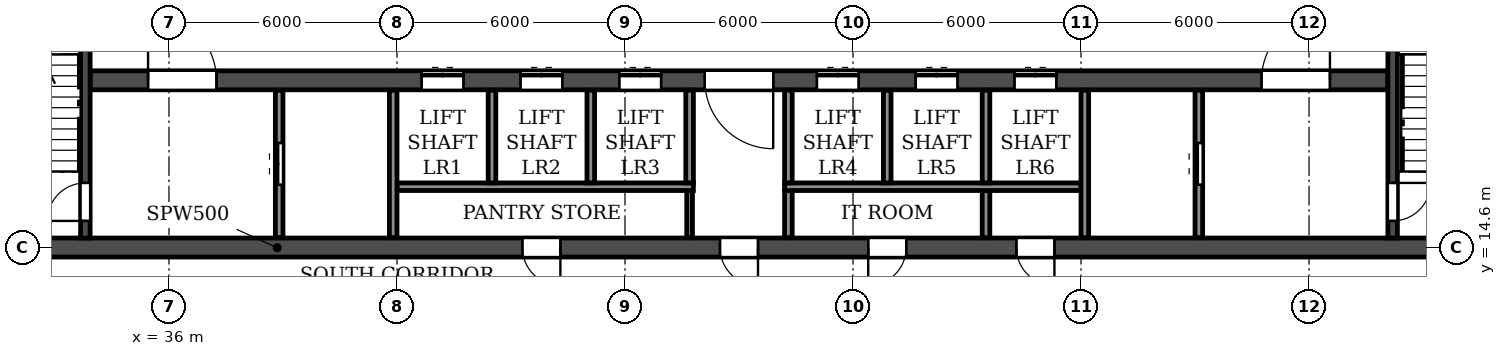
"""IFC4 building model, lengths in metres.
Left out: names, types, materials, properties, quantities, classifications, styles, units other than length and angle.
Written with IfcOpenShell. Run it as: python <this file> out.ifc"""

import sys

from ifc_helpers import new_model, si_unit, direction, frame, frame_2d, origin, place, context, subcontext, project, spatial, rectangle, extrude, element, fill, save


model = new_model("IFC4")
c1 = context("Model", 3, precision=1e-05, world=origin(), true_north=direction((0.0, 1.0)))
c2 = subcontext(c1, "Body", "Model", "MODEL_VIEW")
j1 = project(units=[si_unit("LENGTHUNIT", "METRE"), si_unit("PLANEANGLEUNIT", "RADIAN")], contexts=[c1])
p1 = place(None, origin())
s1 = spatial("IfcSite", under=j1, at=p1, CompositionType="ELEMENT")
p2 = place(p1, origin())
s2 = spatial("IfcBuilding", under=s1, at=p2, CompositionType="ELEMENT")
p3 = place(p2, frame((0.0, 0.0, 105.9)))
s3 = spatial("IfcBuildingStorey", under=s2, at=p3, CompositionType="ELEMENT", Elevation=105.9)
p4 = place(p3, frame((14.6, 14.6, 0.0), z_axis=(0.0, 0.0, 1.0), x_axis=(1.0, 0.0, 0.0)))
e1 = element("IfcWall", 1, at=p4, inside=s3, PredefinedType="SOLIDWALL", context=c2, shape_type="SweptSolid", body=[
    extrude(rectangle(XDim=72.8, YDim=0.5, at=frame_2d((36.4, 0.0))), origin(), (0.0, 0.0, 1.0), 3.06),
])
p5 = place(p4, frame((4.3, 0.0, 0.0)))
e2 = element("IfcOpeningElement", 2, at=p5, cuts=e1, PredefinedType="OPENING", context=c2, shape_type="SweptSolid", body=[
    extrude(rectangle(XDim=1.0, YDim=2.1, at=frame_2d((0.5, 1.05))), frame((0.0, 0.26, 0.0), z_axis=(0.0, -1.0, 0.0), x_axis=(1.0, 0.0, 0.0)), (0.0, 0.0, 1.0), 0.52),
])
p6 = place(p4, frame((12.25, 0.0, 0.0)))
e3 = element("IfcOpeningElement", 3, at=p6, cuts=e1, PredefinedType="OPENING", context=c2, shape_type="SweptSolid", body=[
    extrude(rectangle(XDim=0.9, YDim=2.1, at=frame_2d((0.45, 1.05))), frame((0.0, 0.26, 0.0), z_axis=(0.0, -1.0, 0.0), x_axis=(1.0, 0.0, 0.0)), (0.0, 0.0, 1.0), 0.52),
])
p7 = place(p4, frame((16.8, 0.0, 0.0)))
e4 = element("IfcOpeningElement", 4, at=p7, cuts=e1, PredefinedType="OPENING", context=c2, shape_type="SweptSolid", body=[
    extrude(rectangle(XDim=1.0, YDim=2.1, at=frame_2d((0.5, 1.05))), frame((0.0, 0.26, 0.0), z_axis=(0.0, -1.0, 0.0), x_axis=(1.0, 0.0, 0.0)), (0.0, 0.0, 1.0), 0.52),
])
p8 = place(p4, frame((30.7, 0.0, 0.0)))
e5 = element("IfcOpeningElement", 5, at=p8, cuts=e1, PredefinedType="OPENING", context=c2, shape_type="SweptSolid", body=[
    extrude(rectangle(XDim=1.0, YDim=2.1, at=frame_2d((0.5, 1.05))), frame((0.0, 0.26, 0.0), z_axis=(0.0, -1.0, 0.0), x_axis=(1.0, 0.0, 0.0)), (0.0, 0.0, 1.0), 0.52),
])
p9 = place(p4, frame((35.9, 0.0, 0.0)))
e6 = element("IfcOpeningElement", 6, at=p9, cuts=e1, PredefinedType="OPENING", context=c2, shape_type="SweptSolid", body=[
    extrude(rectangle(XDim=1.0, YDim=2.1, at=frame_2d((0.5, 1.05))), frame((0.0, 0.26, 0.0), z_axis=(0.0, -1.0, 0.0), x_axis=(1.0, 0.0, 0.0)), (0.0, 0.0, 1.0), 0.52),
])
p10 = place(p4, frame((39.8, 0.0, 0.0)))
e7 = element("IfcOpeningElement", 7, at=p10, cuts=e1, PredefinedType="OPENING", context=c2, shape_type="SweptSolid", body=[
    extrude(rectangle(XDim=1.0, YDim=2.1, at=frame_2d((0.5, 1.05))), frame((0.0, 0.26, 0.0), z_axis=(0.0, -1.0, 0.0), x_axis=(1.0, 0.0, 0.0)), (0.0, 0.0, 1.0), 0.52),
])
p11 = place(p4, frame((43.7, 0.0, 0.0)))
e8 = element("IfcOpeningElement", 8, at=p11, cuts=e1, PredefinedType="OPENING", context=c2, shape_type="SweptSolid", body=[
    extrude(rectangle(XDim=1.0, YDim=2.1, at=frame_2d((0.5, 1.05))), frame((0.0, 0.26, 0.0), z_axis=(0.0, -1.0, 0.0), x_axis=(1.0, 0.0, 0.0)), (0.0, 0.0, 1.0), 0.52),
])
p12 = place(p4, frame((55.0, 0.0, 0.0)))
e9 = element("IfcOpeningElement", 9, at=p12, cuts=e1, PredefinedType="OPENING", context=c2, shape_type="SweptSolid", body=[
    extrude(rectangle(XDim=1.0, YDim=2.1, at=frame_2d((0.5, 1.05))), frame((0.0, 0.26, 0.0), z_axis=(0.0, -1.0, 0.0), x_axis=(1.0, 0.0, 0.0)), (0.0, 0.0, 1.0), 0.52),
])
p13 = place(p4, frame((59.65, 0.0, 0.0)))
e10 = element("IfcOpeningElement", 10, at=p13, cuts=e1, PredefinedType="OPENING", context=c2, shape_type="SweptSolid", body=[
    extrude(rectangle(XDim=0.9, YDim=2.1, at=frame_2d((0.45, 1.05))), frame((0.0, 0.26, 0.0), z_axis=(0.0, -1.0, 0.0), x_axis=(1.0, 0.0, 0.0)), (0.0, 0.0, 1.0), 0.52),
])
p14 = place(p4, frame((67.5, 0.0, 0.0)))
e11 = element("IfcOpeningElement", 11, at=p14, cuts=e1, PredefinedType="OPENING", context=c2, shape_type="SweptSolid", body=[
    extrude(rectangle(XDim=1.0, YDim=2.1, at=frame_2d((0.5, 1.05))), frame((0.0, 0.26, 0.0), z_axis=(0.0, -1.0, 0.0), x_axis=(1.0, 0.0, 0.0)), (0.0, 0.0, 1.0), 0.52),
])
p15 = place(p3, frame((33.925, 19.0, 0.0), z_axis=(0.0, 0.0, 1.0), x_axis=(1.0, 0.0, 0.0)))
e12 = element("IfcWall", 12, at=p15, inside=s3, PredefinedType="SOLIDWALL", context=c2, shape_type="SweptSolid", body=[
    extrude(rectangle(XDim=34.15, YDim=0.5, at=frame_2d((17.075, 0.0))), origin(), (0.0, 0.0, 1.0), 3.06),
])
p16 = place(p15, frame((16.175, 0.0, 0.0)))
e13 = element("IfcOpeningElement", 13, at=p16, cuts=e12, PredefinedType="OPENING", context=c2, shape_type="SweptSolid", body=[
    extrude(rectangle(XDim=1.8, YDim=2.1, at=frame_2d((0.9, 1.05))), frame((0.0, 0.26, 0.0), z_axis=(0.0, -1.0, 0.0), x_axis=(1.0, 0.0, 0.0)), (0.0, 0.0, 1.0), 0.52),
])
p17 = place(p15, frame((1.525, 0.0, 0.0)))
e14 = element("IfcOpeningElement", 14, at=p17, cuts=e12, PredefinedType="OPENING", context=c2, shape_type="SweptSolid", body=[
    extrude(rectangle(XDim=1.8, YDim=2.1, at=frame_2d((0.9, 1.05))), frame((0.0, 0.26, 0.0), z_axis=(0.0, -1.0, 0.0), x_axis=(1.0, 0.0, 0.0)), (0.0, 0.0, 1.0), 0.52),
])
p18 = place(p15, frame((8.725, 0.0, 0.0)))
e15 = element("IfcOpeningElement", 15, at=p18, cuts=e12, PredefinedType="OPENING", context=c2, shape_type="SweptSolid", body=[
    extrude(rectangle(XDim=1.1, YDim=2.1, at=frame_2d((0.55, 1.05))), frame((0.0, 0.26, 0.0), z_axis=(0.0, -1.0, 0.0), x_axis=(1.0, 0.0, 0.0)), (0.0, 0.0, 1.0), 0.52),
])
p19 = place(p15, frame((11.325, 0.0, 0.0)))
e16 = element("IfcOpeningElement", 16, at=p19, cuts=e12, PredefinedType="OPENING", context=c2, shape_type="SweptSolid", body=[
    extrude(rectangle(XDim=1.1, YDim=2.1, at=frame_2d((0.55, 1.05))), frame((0.0, 0.26, 0.0), z_axis=(0.0, -1.0, 0.0), x_axis=(1.0, 0.0, 0.0)), (0.0, 0.0, 1.0), 0.52),
])
p20 = place(p15, frame((13.925, 0.0, 0.0)))
e17 = element("IfcOpeningElement", 17, at=p20, cuts=e12, PredefinedType="OPENING", context=c2, shape_type="SweptSolid", body=[
    extrude(rectangle(XDim=1.1, YDim=2.1, at=frame_2d((0.55, 1.05))), frame((0.0, 0.26, 0.0), z_axis=(0.0, -1.0, 0.0), x_axis=(1.0, 0.0, 0.0)), (0.0, 0.0, 1.0), 0.52),
])
p21 = place(p15, frame((19.125, 0.0, 0.0)))
e18 = element("IfcOpeningElement", 18, at=p21, cuts=e12, PredefinedType="OPENING", context=c2, shape_type="SweptSolid", body=[
    extrude(rectangle(XDim=1.1, YDim=2.1, at=frame_2d((0.55, 1.05))), frame((0.0, 0.26, 0.0), z_axis=(0.0, -1.0, 0.0), x_axis=(1.0, 0.0, 0.0)), (0.0, 0.0, 1.0), 0.52),
])
p22 = place(p15, frame((21.725, 0.0, 0.0)))
e19 = element("IfcOpeningElement", 19, at=p22, cuts=e12, PredefinedType="OPENING", context=c2, shape_type="SweptSolid", body=[
    extrude(rectangle(XDim=1.1, YDim=2.1, at=frame_2d((0.55, 1.05))), frame((0.0, 0.26, 0.0), z_axis=(0.0, -1.0, 0.0), x_axis=(1.0, 0.0, 0.0)), (0.0, 0.0, 1.0), 0.52),
])
p23 = place(p15, frame((24.325, 0.0, 0.0)))
e20 = element("IfcOpeningElement", 20, at=p23, cuts=e12, PredefinedType="OPENING", context=c2, shape_type="SweptSolid", body=[
    extrude(rectangle(XDim=1.1, YDim=2.1, at=frame_2d((0.55, 1.05))), frame((0.0, 0.26, 0.0), z_axis=(0.0, -1.0, 0.0), x_axis=(1.0, 0.0, 0.0)), (0.0, 0.0, 1.0), 0.52),
])
p24 = place(p15, frame((30.825, 0.0, 0.0)))
e21 = element("IfcOpeningElement", 21, at=p24, cuts=e12, PredefinedType="OPENING", context=c2, shape_type="SweptSolid", body=[
    extrude(rectangle(XDim=1.8, YDim=2.1, at=frame_2d((0.9, 1.05))), frame((0.0, 0.26, 0.0), z_axis=(0.0, -1.0, 0.0), x_axis=(1.0, 0.0, 0.0)), (0.0, 0.0, 1.0), 0.52),
])
p25 = place(p3, frame((33.8, 14.85, 0.0), z_axis=(0.0, 0.0, 1.0), x_axis=(0.0, 1.0, 0.0)))
e22 = element("IfcWall", 22, at=p25, inside=s3, PredefinedType="SOLIDWALL", context=c2, shape_type="SweptSolid", body=[
    extrude(rectangle(XDim=7.625, YDim=0.25, at=frame_2d((3.812, 0.0))), origin(), (0.0, 0.0, 1.0), 3.06),
])
p26 = place(p25, frame((0.45, 0.0, 0.0)))
e23 = element("IfcOpeningElement", 23, at=p26, cuts=e22, PredefinedType="OPENING", context=c2, shape_type="SweptSolid", body=[
    extrude(rectangle(XDim=1.0, YDim=2.1, at=frame_2d((0.5, 1.05))), frame((0.0, 0.135, 0.0), z_axis=(0.0, -1.0, 0.0), x_axis=(1.0, 0.0, 0.0)), (0.0, 0.0, 1.0), 0.27),
])
p27 = place(p3, frame((68.2, 14.85, 0.0), z_axis=(0.0, 0.0, 1.0), x_axis=(0.0, 1.0, 0.0)))
e24 = element("IfcWall", 24, at=p27, inside=s3, PredefinedType="SOLIDWALL", context=c2, shape_type="SweptSolid", body=[
    extrude(rectangle(XDim=7.625, YDim=0.25, at=frame_2d((3.812, 0.0))), origin(), (0.0, 0.0, 1.0), 3.06),
])
p28 = place(p27, frame((0.45, 0.0, 0.0)))
e25 = element("IfcOpeningElement", 25, at=p28, cuts=e24, PredefinedType="OPENING", context=c2, shape_type="SweptSolid", body=[
    extrude(rectangle(XDim=1.0, YDim=2.1, at=frame_2d((0.5, 1.05))), frame((0.0, 0.135, 0.0), z_axis=(0.0, -1.0, 0.0), x_axis=(1.0, 0.0, 0.0)), (0.0, 0.0, 1.0), 0.27),
])
p29 = place(p3, frame((49.7, 14.86, 0.0), z_axis=(0.0, 0.0, 1.0), x_axis=(0.0, 1.0, 0.0)))
e26 = element("IfcWall", 26, at=p29, inside=s3, PredefinedType="PARTITIONING", context=c2, shape_type="SweptSolid", body=[
    extrude(rectangle(XDim=1.24, YDim=0.15, at=frame_2d((0.62, 0.0))), origin(), (0.0, 0.0, 1.0), 3.06),
])
for number, where, z_axis, x_axis in (
    (27, (52.3, 14.86, 0.0), (0.0, 0.0, 1.0), (0.0, 1.0, 0.0)),
    (28, (57.5, 14.86, 0.0), (0.0, 0.0, 1.0), (0.0, 1.0, 0.0)),
):
    element("IfcWall", number, at=place(p3, frame(where, z_axis=z_axis, x_axis=x_axis)), inside=s3, PredefinedType="PARTITIONING", context=c2, shape_type="SweptSolid", body=[
        extrude(rectangle(XDim=1.24, YDim=0.2, at=frame_2d((0.62, 0.0))), origin(), (0.0, 0.0, 1.0), 3.06),
    ])
for number, where, z_axis, x_axis in (
    (29, (42.0, 16.2, 0.0), (0.0, 0.0, 1.0), (1.0, 0.0, 0.0)),
    (30, (52.2, 16.2, 0.0), (0.0, 0.0, 1.0), (1.0, 0.0, 0.0)),
):
    element("IfcWall", number, at=place(p3, frame(where, z_axis=z_axis, x_axis=x_axis)), inside=s3, PredefinedType="PARTITIONING", context=c2, shape_type="SweptSolid", body=[
        extrude(rectangle(XDim=7.8, YDim=0.2, at=frame_2d((3.9, 0.0))), origin(), (0.0, 0.0, 1.0), 3.06),
    ])
p30 = place(p3, frame((38.9, 14.86, 0.0), z_axis=(0.0, 0.0, 1.0), x_axis=(0.0, 1.0, 0.0)))
e31 = element("IfcWall", 31, at=p30, inside=s3, PredefinedType="PARTITIONING", context=c2, shape_type="SweptSolid", body=[
    extrude(rectangle(XDim=3.88, YDim=0.2, at=frame_2d((1.94, 0.0))), origin(), (0.0, 0.0, 1.0), 3.06),
])
p31 = place(p30, frame((1.39, 0.0, 0.0)))
e32 = element("IfcOpeningElement", 32, at=p31, cuts=e31, PredefinedType="OPENING", context=c2, shape_type="SweptSolid", body=[
    extrude(rectangle(XDim=1.1, YDim=2.1, at=frame_2d((0.55, 1.05))), frame((0.0, 0.11, 0.0), z_axis=(0.0, -1.0, 0.0), x_axis=(1.0, 0.0, 0.0)), (0.0, 0.0, 1.0), 0.22),
])
p32 = place(p3, frame((41.9, 14.86, 0.0), z_axis=(0.0, 0.0, 1.0), x_axis=(0.0, 1.0, 0.0)))
e33 = element("IfcWall", 33, at=p32, inside=s3, PredefinedType="PARTITIONING", context=c2, shape_type="SweptSolid", body=[
    extrude(rectangle(XDim=3.88, YDim=0.2, at=frame_2d((1.94, 0.0))), origin(), (0.0, 0.0, 1.0), 3.06),
])
for number, where, z_axis, x_axis in (
    (34, (44.5, 16.3, 0.0), (0.0, 0.0, 1.0), (0.0, 1.0, 0.0)),
    (35, (47.1, 16.3, 0.0), (0.0, 0.0, 1.0), (0.0, 1.0, 0.0)),
    (36, (49.7, 16.3, 0.0), (0.0, 0.0, 1.0), (0.0, 1.0, 0.0)),
    (37, (52.3, 16.3, 0.0), (0.0, 0.0, 1.0), (0.0, 1.0, 0.0)),
    (38, (54.9, 16.3, 0.0), (0.0, 0.0, 1.0), (0.0, 1.0, 0.0)),
    (39, (57.5, 16.3, 0.0), (0.0, 0.0, 1.0), (0.0, 1.0, 0.0)),
):
    element("IfcWall", number, at=place(p3, frame(where, z_axis=z_axis, x_axis=x_axis)), inside=s3, PredefinedType="PARTITIONING", context=c2, shape_type="SweptSolid", body=[
        extrude(rectangle(XDim=2.44, YDim=0.2, at=frame_2d((1.22, 0.0))), origin(), (0.0, 0.0, 1.0), 3.06),
    ])
p33 = place(p3, frame((60.1, 14.86, 0.0), z_axis=(0.0, 0.0, 1.0), x_axis=(0.0, 1.0, 0.0)))
e40 = element("IfcWall", 40, at=p33, inside=s3, PredefinedType="PARTITIONING", context=c2, shape_type="SweptSolid", body=[
    extrude(rectangle(XDim=3.88, YDim=0.2, at=frame_2d((1.94, 0.0))), origin(), (0.0, 0.0, 1.0), 3.06),
])
p34 = place(p3, frame((63.1, 14.86, 0.0), z_axis=(0.0, 0.0, 1.0), x_axis=(0.0, 1.0, 0.0)))
e41 = element("IfcWall", 41, at=p34, inside=s3, PredefinedType="PARTITIONING", context=c2, shape_type="SweptSolid", body=[
    extrude(rectangle(XDim=3.88, YDim=0.2, at=frame_2d((1.94, 0.0))), origin(), (0.0, 0.0, 1.0), 3.06),
])
p35 = place(p34, frame((1.39, 0.0, 0.0)))
e42 = element("IfcOpeningElement", 42, at=p35, cuts=e41, PredefinedType="OPENING", context=c2, shape_type="SweptSolid", body=[
    extrude(rectangle(XDim=1.1, YDim=2.1, at=frame_2d((0.55, 1.05))), frame((0.0, 0.11, 0.0), z_axis=(0.0, -1.0, 0.0), x_axis=(1.0, 0.0, 0.0)), (0.0, 0.0, 1.0), 0.22),
])
p36 = place(p8, frame((1.0, 0.0, 0.0), z_axis=(0.0, 0.0, 1.0), x_axis=(-1.0, 0.0, 0.0)))
e43 = element("IfcDoor", 43, at=p36, inside=s3, OperationType="SINGLE_SWING_LEFT", PredefinedType="DOOR", context=c2, shape_type="SweptSolid", body=[
    extrude(rectangle(XDim=1.0, YDim=2.1, at=frame_2d((0.5, 1.05))), frame((0.0, 0.025, 0.0), z_axis=(0.0, -1.0, 0.0), x_axis=(1.0, 0.0, 0.0)), (0.0, 0.0, 1.0), 0.05),
])
fill(e5, e43)
p37 = place(p9, frame((1.0, 0.0, 0.0), z_axis=(0.0, 0.0, 1.0), x_axis=(-1.0, 0.0, 0.0)))
e44 = element("IfcDoor", 44, at=p37, inside=s3, OperationType="SINGLE_SWING_LEFT", PredefinedType="DOOR", context=c2, shape_type="SweptSolid", body=[
    extrude(rectangle(XDim=1.0, YDim=2.1, at=frame_2d((0.5, 1.05))), frame((0.0, 0.025, 0.0), z_axis=(0.0, -1.0, 0.0), x_axis=(1.0, 0.0, 0.0)), (0.0, 0.0, 1.0), 0.05),
])
fill(e6, e44)
p38 = place(p10, frame((1.0, 0.0, 0.0), z_axis=(0.0, 0.0, 1.0), x_axis=(-1.0, 0.0, 0.0)))
e45 = element("IfcDoor", 45, at=p38, inside=s3, OperationType="SINGLE_SWING_RIGHT", PredefinedType="DOOR", context=c2, shape_type="SweptSolid", body=[
    extrude(rectangle(XDim=1.0, YDim=2.1, at=frame_2d((0.5, 1.05))), frame((0.0, 0.025, 0.0), z_axis=(0.0, -1.0, 0.0), x_axis=(1.0, 0.0, 0.0)), (0.0, 0.0, 1.0), 0.05),
])
fill(e7, e45)
p39 = place(p11, frame((1.0, 0.0, 0.0), z_axis=(0.0, 0.0, 1.0), x_axis=(-1.0, 0.0, 0.0)))
e46 = element("IfcDoor", 46, at=p39, inside=s3, OperationType="SINGLE_SWING_LEFT", PredefinedType="DOOR", context=c2, shape_type="SweptSolid", body=[
    extrude(rectangle(XDim=1.0, YDim=2.1, at=frame_2d((0.5, 1.05))), frame((0.0, 0.025, 0.0), z_axis=(0.0, -1.0, 0.0), x_axis=(1.0, 0.0, 0.0)), (0.0, 0.0, 1.0), 0.05),
])
fill(e8, e46)
p40 = place(p35, origin())
e47 = element("IfcDoor", 47, at=p40, inside=s3, OperationType="DOUBLE_DOOR_SLIDING", PredefinedType="DOOR", context=c2, shape_type="SweptSolid", body=[
    extrude(rectangle(XDim=1.1, YDim=2.1, at=frame_2d((0.55, 1.05))), frame((0.0, 0.025, 0.0), z_axis=(0.0, -1.0, 0.0), x_axis=(1.0, 0.0, 0.0)), (0.0, 0.0, 1.0), 0.05),
])
fill(e42, e47)
p41 = place(p28, frame((1.0, 0.0, 0.0), z_axis=(0.0, 0.0, 1.0), x_axis=(-1.0, 0.0, 0.0)))
e48 = element("IfcDoor", 48, at=p41, inside=s3, OperationType="SINGLE_SWING_LEFT", PredefinedType="DOOR", context=c2, shape_type="SweptSolid", body=[
    extrude(rectangle(XDim=1.0, YDim=2.1, at=frame_2d((0.5, 1.05))), frame((0.0, 0.025, 0.0), z_axis=(0.0, -1.0, 0.0), x_axis=(1.0, 0.0, 0.0)), (0.0, 0.0, 1.0), 0.05),
])
fill(e25, e48)
p42 = place(p26, origin())
e49 = element("IfcDoor", 49, at=p42, inside=s3, OperationType="SINGLE_SWING_LEFT", PredefinedType="DOOR", context=c2, shape_type="SweptSolid", body=[
    extrude(rectangle(XDim=1.0, YDim=2.1, at=frame_2d((0.5, 1.05))), frame((0.0, 0.025, 0.0), z_axis=(0.0, -1.0, 0.0), x_axis=(1.0, 0.0, 0.0)), (0.0, 0.0, 1.0), 0.05),
])
fill(e23, e49)
p43 = place(p31, origin())
e50 = element("IfcDoor", 50, at=p43, inside=s3, OperationType="DOUBLE_DOOR_SLIDING", PredefinedType="DOOR", context=c2, shape_type="SweptSolid", body=[
    extrude(rectangle(XDim=1.1, YDim=2.1, at=frame_2d((0.55, 1.05))), frame((0.0, 0.025, 0.0), z_axis=(0.0, -1.0, 0.0), x_axis=(1.0, 0.0, 0.0)), (0.0, 0.0, 1.0), 0.05),
])
fill(e32, e50)
p44 = place(p16, frame((1.8, 0.0, 0.0), z_axis=(0.0, 0.0, 1.0), x_axis=(-1.0, 0.0, 0.0)))
e51 = element("IfcDoor", 51, at=p44, inside=s3, OperationType="DOUBLE_DOOR_SINGLE_SWING", PredefinedType="DOOR", context=c2, shape_type="SweptSolid", body=[
    extrude(rectangle(XDim=1.8, YDim=2.1, at=frame_2d((0.9, 1.05))), frame((0.0, 0.025, 0.0), z_axis=(0.0, -1.0, 0.0), x_axis=(1.0, 0.0, 0.0)), (0.0, 0.0, 1.0), 0.05),
])
fill(e13, e51)
p45 = place(p17, origin())
e52 = element("IfcDoor", 52, at=p45, inside=s3, OperationType="DOUBLE_DOOR_SINGLE_SWING", PredefinedType="DOOR", context=c2, shape_type="SweptSolid", body=[
    extrude(rectangle(XDim=1.8, YDim=2.1, at=frame_2d((0.9, 1.05))), frame((0.0, 0.025, 0.0), z_axis=(0.0, -1.0, 0.0), x_axis=(1.0, 0.0, 0.0)), (0.0, 0.0, 1.0), 0.05),
])
fill(e14, e52)
p46 = place(p18, origin())
e53 = element("IfcDoor", 53, at=p46, inside=s3, OperationType="DOUBLE_DOOR_SLIDING", PredefinedType="DOOR", context=c2, shape_type="SweptSolid", body=[
    extrude(rectangle(XDim=1.1, YDim=2.1, at=frame_2d((0.55, 1.05))), frame((0.0, 0.025, 0.0), z_axis=(0.0, -1.0, 0.0), x_axis=(1.0, 0.0, 0.0)), (0.0, 0.0, 1.0), 0.05),
])
fill(e15, e53)
p47 = place(p19, origin())
e54 = element("IfcDoor", 54, at=p47, inside=s3, OperationType="DOUBLE_DOOR_SLIDING", PredefinedType="DOOR", context=c2, shape_type="SweptSolid", body=[
    extrude(rectangle(XDim=1.1, YDim=2.1, at=frame_2d((0.55, 1.05))), frame((0.0, 0.025, 0.0), z_axis=(0.0, -1.0, 0.0), x_axis=(1.0, 0.0, 0.0)), (0.0, 0.0, 1.0), 0.05),
])
fill(e16, e54)
p48 = place(p20, origin())
e55 = element("IfcDoor", 55, at=p48, inside=s3, OperationType="DOUBLE_DOOR_SLIDING", PredefinedType="DOOR", context=c2, shape_type="SweptSolid", body=[
    extrude(rectangle(XDim=1.1, YDim=2.1, at=frame_2d((0.55, 1.05))), frame((0.0, 0.025, 0.0), z_axis=(0.0, -1.0, 0.0), x_axis=(1.0, 0.0, 0.0)), (0.0, 0.0, 1.0), 0.05),
])
fill(e17, e55)
p49 = place(p21, origin())
e56 = element("IfcDoor", 56, at=p49, inside=s3, OperationType="DOUBLE_DOOR_SLIDING", PredefinedType="DOOR", context=c2, shape_type="SweptSolid", body=[
    extrude(rectangle(XDim=1.1, YDim=2.1, at=frame_2d((0.55, 1.05))), frame((0.0, 0.025, 0.0), z_axis=(0.0, -1.0, 0.0), x_axis=(1.0, 0.0, 0.0)), (0.0, 0.0, 1.0), 0.05),
])
fill(e18, e56)
p50 = place(p22, origin())
e57 = element("IfcDoor", 57, at=p50, inside=s3, OperationType="DOUBLE_DOOR_SLIDING", PredefinedType="DOOR", context=c2, shape_type="SweptSolid", body=[
    extrude(rectangle(XDim=1.1, YDim=2.1, at=frame_2d((0.55, 1.05))), frame((0.0, 0.025, 0.0), z_axis=(0.0, -1.0, 0.0), x_axis=(1.0, 0.0, 0.0)), (0.0, 0.0, 1.0), 0.05),
])
fill(e19, e57)
p51 = place(p23, origin())
e58 = element("IfcDoor", 58, at=p51, inside=s3, OperationType="DOUBLE_DOOR_SLIDING", PredefinedType="DOOR", context=c2, shape_type="SweptSolid", body=[
    extrude(rectangle(XDim=1.1, YDim=2.1, at=frame_2d((0.55, 1.05))), frame((0.0, 0.025, 0.0), z_axis=(0.0, -1.0, 0.0), x_axis=(1.0, 0.0, 0.0)), (0.0, 0.0, 1.0), 0.05),
])
fill(e20, e58)
p52 = place(p24, origin())
e59 = element("IfcDoor", 59, at=p52, inside=s3, OperationType="DOUBLE_DOOR_SINGLE_SWING", PredefinedType="DOOR", context=c2, shape_type="SweptSolid", body=[
    extrude(rectangle(XDim=1.8, YDim=2.1, at=frame_2d((0.9, 1.05))), frame((0.0, 0.025, 0.0), z_axis=(0.0, -1.0, 0.0), x_axis=(1.0, 0.0, 0.0)), (0.0, 0.0, 1.0), 0.05),
])
fill(e21, e59)
save(model, sys.argv[1])
